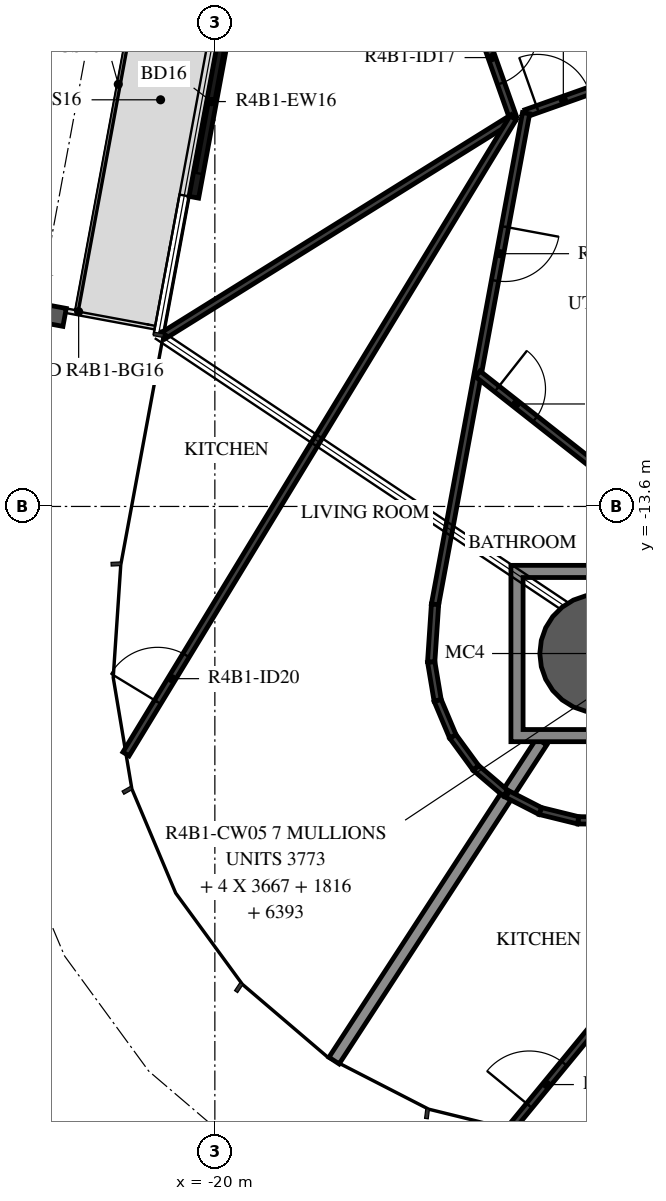
"""IFC4 building model, lengths in metres.
Left out: names, types, materials, properties, quantities, classifications, styles, units other than length and angle.
Written with IfcOpenShell. Run it as: python <this file> out.ifc"""

import sys

from ifc_helpers import new_model, si_unit, direction, frame, frame_2d, origin, origin_2d, place, context, subcontext, project, spatial, polyline, rectangle, hollow_circle, i_section, outline, extrude, element, fill, save


model = new_model("IFC4")
c1 = context("Model", 3, precision=1e-05, world=origin(), true_north=direction((0.0, 1.0)))
c2 = subcontext(c1, "Body", "Model", "MODEL_VIEW")
j1 = project(units=[si_unit("LENGTHUNIT", "METRE"), si_unit("PLANEANGLEUNIT", "RADIAN")], contexts=[c1])
p1 = place(None, origin())
s1 = spatial("IfcSite", under=j1, at=p1, CompositionType="ELEMENT")
p2 = place(p1, origin())
s2 = spatial("IfcBuilding", under=s1, at=p2, CompositionType="ELEMENT")
p3 = place(p2, frame((0.0, 0.0, 162.2)))
s3 = spatial("IfcBuildingStorey", under=s2, at=p3, CompositionType="ELEMENT", Elevation=162.2)
p4 = place(p3, frame((-13.681, -16.019, -0.38), z_axis=(0.0, 0.0, 1.0), x_axis=(1.0, 0.0, 0.0)))
e1 = element("IfcColumn", 1, at=p4, inside=s3, PredefinedType="COLUMN", context=c2, shape_type="SweptSolid", body=[
    extrude(hollow_circle(Radius=0.975, WallThickness=0.045, at=origin_2d()), origin(), (0.0, 0.0, 1.0), 3.5),
])
p5 = place(p3, frame((-22.914, -10.409, -0.38), z_axis=(0.0, 0.0, 1.0), x_axis=(0.182235967681, 0.983254825609, 0.0)))
e2 = element("IfcColumn", 2, at=p5, inside=s3, PredefinedType="COLUMN", context=c2, shape_type="SweptSolid", body=[
    extrude(i_section(OverallWidth=0.3, OverallDepth=0.9, WebThickness=0.019, FlangeThickness=0.035, FilletRadius=0.03, at=origin_2d()), origin(), (0.0, 0.0, 1.0), 3.5),
])
p6 = place(p3, frame((-19.762, -5.369, 0.0), z_axis=(0.0, 0.0, 1.0), x_axis=(-0.18226136951, -0.983250117307, 0.0)))
e3 = element("IfcWall", 3, at=p6, inside=s3, PredefinedType="STANDARD", context=c2, shape_type="SweptSolid", body=[
    extrude(rectangle(XDim=3.2, YDim=0.16, at=frame_2d((1.6, 0.0))), origin(), (0.0, 0.0, 1.0), 3.12),
])
p7 = place(p6, frame((0.4, 0.0, 0.0)))
e4 = element("IfcOpeningElement", 4, at=p7, cuts=e3, PredefinedType="OPENING", context=c2, shape_type="SweptSolid", body=[
    extrude(rectangle(XDim=2.4, YDim=2.4, at=frame_2d((1.2, 1.2))), frame((0.0, 0.09, 0.0), z_axis=(0.0, -1.0, 0.0), x_axis=(1.0, 0.0, 0.0)), (0.0, 0.0, 1.0), 0.18),
])
p8 = place(p3, frame((-18.04, -22.713, 0.0), z_axis=(0.0, 0.0, 1.0), x_axis=(0.545628572271, 0.838027124335, 0.0)))
e5 = element("IfcWall", 5, at=p8, inside=s3, PredefinedType="STANDARD", context=c2, shape_type="SweptSolid", body=[
    extrude(rectangle(XDim=6.258, YDim=0.2, at=frame_2d((3.129, 0.0))), origin(), (0.0, 0.0, 1.0), 2.73),
])
p9 = place(p3, frame((-15.663, -5.606, 0.0), z_axis=(0.0, 0.0, 1.0), x_axis=(0.333751436931, -0.942661115325, 0.0)))
e6 = element("IfcWall", 6, at=p9, inside=s3, PredefinedType="PARTITIONING", context=c2, shape_type="SweptSolid", body=[
    extrude(rectangle(XDim=1.7, YDim=0.12, at=frame_2d((0.85, 0.0))), origin(), (0.0, 0.0, 1.0), 3.12),
])
p10 = place(p9, frame((0.2, 0.0, 0.0)))
e7 = element("IfcOpeningElement", 7, at=p10, cuts=e6, PredefinedType="OPENING", context=c2, shape_type="SweptSolid", body=[
    extrude(rectangle(XDim=0.9, YDim=2.1, at=frame_2d((0.45, 1.05))), frame((0.0, 0.07, 0.0), z_axis=(0.0, -1.0, 0.0), x_axis=(1.0, 0.0, 0.0)), (0.0, 0.0, 1.0), 0.14),
])
p11 = place(p3, frame((-14.882, -7.133, 0.0), z_axis=(0.0, 0.0, 1.0), x_axis=(0.942631466676, 0.333835165961, 0.0)))
e8 = element("IfcWall", 8, at=p11, inside=s3, PredefinedType="PARTITIONING", context=c2, shape_type="SweptSolid", body=[
    extrude(rectangle(XDim=1.51, YDim=0.12, at=frame_2d((0.755, 0.0))), origin(), (0.0, 0.0, 1.0), 3.12),
])
p12 = place(p11, frame((0.2, 0.0, 0.0)))
e9 = element("IfcOpeningElement", 9, at=p12, cuts=e8, PredefinedType="OPENING", context=c2, shape_type="SweptSolid", body=[
    extrude(rectangle(XDim=0.9, YDim=2.1, at=frame_2d((0.45, 1.05))), frame((0.0, 0.07, 0.0), z_axis=(0.0, -1.0, 0.0), x_axis=(1.0, 0.0, 0.0)), (0.0, 0.0, 1.0), 0.14),
])
p13 = place(p3, frame((-20.849, -10.792, 0.0), z_axis=(0.0, 0.0, 1.0), x_axis=(0.848835001009, 0.528657867682, 0.0)))
e10 = element("IfcWall", 10, at=p13, inside=s3, PredefinedType="PARTITIONING", context=c2, shape_type="SweptSolid", body=[
    extrude(rectangle(XDim=6.778, YDim=0.12, at=frame_2d((3.389, 0.0))), origin(), (0.0, 0.0, 1.0), 3.12),
])
p14 = place(p3, frame((-21.461, -17.671, 0.0), z_axis=(0.0, 0.0, 1.0), x_axis=(0.519791999186, 0.854292852353, 0.0)))
e11 = element("IfcWall", 11, at=p14, inside=s3, PredefinedType="PARTITIONING", context=c2, shape_type="SweptSolid", body=[
    extrude(rectangle(XDim=12.247, YDim=0.12, at=frame_2d((6.124, 0.0))), origin(), (0.0, 0.0, 1.0), 3.12),
])
p15 = place(p14, frame((1.0, 0.0, 0.0)))
e12 = element("IfcOpeningElement", 12, at=p15, cuts=e11, PredefinedType="OPENING", context=c2, shape_type="SweptSolid", body=[
    extrude(rectangle(XDim=0.9, YDim=2.1, at=frame_2d((0.45, 1.05))), frame((0.0, 0.07, 0.0), z_axis=(0.0, -1.0, 0.0), x_axis=(1.0, 0.0, 0.0)), (0.0, 0.0, 1.0), 0.14),
])
p16 = place(p3, frame((-14.882, -7.133, 0.0), z_axis=(0.0, 0.0, 1.0), x_axis=(-0.182231858218, -0.983255587246, 0.0)))
e13 = element("IfcWall", 13, at=p16, inside=s3, PredefinedType="PARTITIONING", context=c2, shape_type="SweptSolid", body=[
    extrude(rectangle(XDim=8.215, YDim=0.12, at=frame_2d((4.107, 0.0))), origin(), (0.0, 0.0, 1.0), 3.12),
])
p17 = place(p16, frame((1.9, 0.0, 0.0)))
e14 = element("IfcOpeningElement", 14, at=p17, cuts=e13, PredefinedType="OPENING", context=c2, shape_type="SweptSolid", body=[
    extrude(rectangle(XDim=0.9, YDim=2.1, at=frame_2d((0.45, 1.05))), frame((0.0, 0.07, 0.0), z_axis=(0.0, -1.0, 0.0), x_axis=(1.0, 0.0, 0.0)), (0.0, 0.0, 1.0), 0.14),
])
p18 = place(p3, frame((-15.677, -11.42, 0.0), z_axis=(0.0, 0.0, 1.0), x_axis=(0.785821888461, -0.618452875824, 0.0)))
e15 = element("IfcWall", 15, at=p18, inside=s3, PredefinedType="PARTITIONING", context=c2, shape_type="SweptSolid", body=[
    extrude(rectangle(XDim=4.507, YDim=0.12, at=frame_2d((2.254, 0.0))), origin(), (0.0, 0.0, 1.0), 3.12),
])
p19 = place(p18, frame((0.4, 0.0, 0.0)))
e16 = element("IfcOpeningElement", 16, at=p19, cuts=e15, PredefinedType="OPENING", context=c2, shape_type="SweptSolid", body=[
    extrude(rectangle(XDim=0.8, YDim=2.1, at=frame_2d((0.4, 1.05))), frame((0.0, 0.07, 0.0), z_axis=(0.0, -1.0, 0.0), x_axis=(1.0, 0.0, 0.0)), (0.0, 0.0, 1.0), 0.14),
])
for number, where, z_axis, x_axis in (
    (17, (-15.22, -18.315, 0.0), (0.0, 0.0, 1.0), (-0.76, 0.65, 0.0)),
    (18, (-15.708, -17.898, 0.0), (0.0, 0.0, 1.0), (-0.59, 0.807, 0.0)),
):
    element("IfcWall", number, at=place(p3, frame(where, z_axis=z_axis, x_axis=x_axis)), inside=s3, PredefinedType="PARTITIONING", context=c2, shape_type="SweptSolid", body=[
        extrude(rectangle(XDim=0.642, YDim=0.12, at=frame_2d((0.321, 0.0))), origin(), (0.0, 0.0, 1.0), 3.12),
    ])
p20 = place(p3, frame((-16.087, -17.38, 0.0), z_axis=(0.0, 0.0, 1.0), x_axis=(-0.387852998664, 0.921721243884, 0.0)))
e19 = element("IfcWall", 19, at=p20, inside=s3, PredefinedType="PARTITIONING", context=c2, shape_type="SweptSolid", body=[
    extrude(rectangle(XDim=0.642, YDim=0.12, at=frame_2d((0.321, 0.0))), origin(), (0.0, 0.0, 1.0), 3.12),
])
p21 = place(p3, frame((-16.336, -16.788, 0.0), z_axis=(0.0, 0.0, 1.0), x_axis=(-0.165077433319, 0.986280609669, 0.0)))
e20 = element("IfcWall", 20, at=p21, inside=s3, PredefinedType="PARTITIONING", context=c2, shape_type="SweptSolid", body=[
    extrude(rectangle(XDim=0.642, YDim=0.12, at=frame_2d((0.321, 0.0))), origin(), (0.0, 0.0, 1.0), 3.12),
])
p22 = place(p3, frame((-16.442, -16.155, 0.0), z_axis=(0.0, 0.0, 1.0), x_axis=(0.066775688713, 0.997768012815, 0.0)))
e21 = element("IfcWall", 21, at=p22, inside=s3, PredefinedType="PARTITIONING", context=c2, shape_type="SweptSolid", body=[
    extrude(rectangle(XDim=0.947, YDim=0.12, at=frame_2d((0.474, 0.0))), origin(), (0.0, 0.0, 1.0), 3.12),
])
p23 = place(p3, frame((-13.384, -18.767, 0.0), z_axis=(0.0, 0.0, 1.0), x_axis=(-0.999965015064, 0.008364726362, 0.0)))
e22 = element("IfcWall", 22, at=p23, inside=s3, PredefinedType="PARTITIONING", context=c2, shape_type="SweptSolid", body=[
    extrude(rectangle(XDim=0.642, YDim=0.12, at=frame_2d((0.321, 0.0))), origin(), (0.0, 0.0, 1.0), 3.12),
])
p24 = place(p3, frame((-14.026, -18.762, 0.0), z_axis=(0.0, 0.0, 1.0), x_axis=(-0.970964611728, 0.239223165208, 0.0)))
e23 = element("IfcWall", 23, at=p24, inside=s3, PredefinedType="PARTITIONING", context=c2, shape_type="SweptSolid", body=[
    extrude(rectangle(XDim=0.642, YDim=0.12, at=frame_2d((0.321, 0.0))), origin(), (0.0, 0.0, 1.0), 3.12),
])
p25 = place(p3, frame((-14.649, -18.608, 0.0), z_axis=(0.0, 0.0, 1.0), x_axis=(-0.889695551631, 0.456554296232, 0.0)))
e24 = element("IfcWall", 24, at=p25, inside=s3, PredefinedType="PARTITIONING", context=c2, shape_type="SweptSolid", body=[
    extrude(rectangle(XDim=0.605, YDim=0.12, at=frame_2d((0.302, 0.0))), origin(), (0.0, 0.0, 1.0), 3.12),
])
p26 = place(p3, frame((-15.146, -23.841, 0.0), z_axis=(0.0, 0.0, 1.0), x_axis=(0.634970373647, 0.772536487547, 0.0)))
e25 = element("IfcWall", 25, at=p26, inside=s3, PredefinedType="PARTITIONING", context=c2, shape_type="SweptSolid", body=[
    extrude(rectangle(XDim=7.912, YDim=0.12, at=frame_2d((3.956, 0.0))), origin(), (0.0, 0.0, 1.0), 3.12),
])
p27 = place(p26, frame((0.5, 0.0, 0.0)))
e26 = element("IfcOpeningElement", 26, at=p27, cuts=e25, PredefinedType="OPENING", context=c2, shape_type="SweptSolid", body=[
    extrude(rectangle(XDim=0.9, YDim=2.1, at=frame_2d((0.45, 1.05))), frame((0.0, 0.07, 0.0), z_axis=(0.0, -1.0, 0.0), x_axis=(1.0, 0.0, 0.0)), (0.0, 0.0, 1.0), 0.14),
])
p28 = place(p3, origin())
e27 = element("IfcWall", 27, at=p28, inside=s3, PredefinedType="STANDARD", context=c2, shape_type="SweptSolid", body=[
    extrude(outline(polyline([(-12.231, -14.569), (-12.231, -17.469), (-15.131, -17.469), (-15.131, -14.569), (-12.231, -14.569)]), holes=[polyline([(-14.931, -17.269), (-12.431, -17.269), (-12.431, -14.769), (-14.931, -14.769), (-14.931, -17.269)])]), origin(), (0.0, 0.0, 1.0), 3.12),
])
p29 = place(p7, origin())
e28 = element("IfcDoor", 28, at=p29, inside=s3, OperationType="DOUBLE_DOOR_SLIDING", PredefinedType="DOOR", context=c2, shape_type="SweptSolid", body=[
    extrude(rectangle(XDim=2.4, YDim=2.4, at=frame_2d((1.2, 1.2))), frame((0.0, 0.025, 0.0), z_axis=(0.0, -1.0, 0.0), x_axis=(1.0, 0.0, 0.0)), (0.0, 0.0, 1.0), 0.05),
])
fill(e4, e28)
p30 = place(p10, origin())
e29 = element("IfcDoor", 29, at=p30, inside=s3, OperationType="SINGLE_SWING_RIGHT", PredefinedType="DOOR", context=c2, shape_type="SweptSolid", body=[
    extrude(rectangle(XDim=0.9, YDim=2.1, at=frame_2d((0.45, 1.05))), frame((0.0, 0.025, 0.0), z_axis=(0.0, -1.0, 0.0), x_axis=(1.0, 0.0, 0.0)), (0.0, 0.0, 1.0), 0.05),
])
fill(e7, e29)
p31 = place(p12, origin())
e30 = element("IfcDoor", 30, at=p31, inside=s3, OperationType="SINGLE_SWING_LEFT", PredefinedType="DOOR", context=c2, shape_type="SweptSolid", body=[
    extrude(rectangle(XDim=0.9, YDim=2.1, at=frame_2d((0.45, 1.05))), frame((0.0, 0.025, 0.0), z_axis=(0.0, -1.0, 0.0), x_axis=(1.0, 0.0, 0.0)), (0.0, 0.0, 1.0), 0.05),
])
fill(e9, e30)
p32 = place(p17, origin())
e31 = element("IfcDoor", 31, at=p32, inside=s3, OperationType="SINGLE_SWING_RIGHT", PredefinedType="DOOR", context=c2, shape_type="SweptSolid", body=[
    extrude(rectangle(XDim=0.9, YDim=2.1, at=frame_2d((0.45, 1.05))), frame((0.0, 0.025, 0.0), z_axis=(0.0, -1.0, 0.0), x_axis=(1.0, 0.0, 0.0)), (0.0, 0.0, 1.0), 0.05),
])
fill(e14, e31)
p33 = place(p19, origin())
e32 = element("IfcDoor", 32, at=p33, inside=s3, OperationType="SINGLE_SWING_RIGHT", PredefinedType="DOOR", context=c2, shape_type="SweptSolid", body=[
    extrude(rectangle(XDim=0.8, YDim=2.1, at=frame_2d((0.4, 1.05))), frame((0.0, 0.025, 0.0), z_axis=(0.0, -1.0, 0.0), x_axis=(1.0, 0.0, 0.0)), (0.0, 0.0, 1.0), 0.05),
])
fill(e16, e32)
p34 = place(p15, origin())
e33 = element("IfcDoor", 33, at=p34, inside=s3, OperationType="SINGLE_SWING_LEFT", PredefinedType="DOOR", context=c2, shape_type="SweptSolid", body=[
    extrude(rectangle(XDim=0.9, YDim=2.1, at=frame_2d((0.45, 1.05))), frame((0.0, 0.025, 0.0), z_axis=(0.0, -1.0, 0.0), x_axis=(1.0, 0.0, 0.0)), (0.0, 0.0, 1.0), 0.05),
])
fill(e12, e33)
p35 = place(p27, origin())
e34 = element("IfcDoor", 34, at=p35, inside=s3, OperationType="SINGLE_SWING_LEFT", PredefinedType="DOOR", context=c2, shape_type="SweptSolid", body=[
    extrude(rectangle(XDim=0.9, YDim=2.1, at=frame_2d((0.45, 1.05))), frame((0.0, 0.025, 0.0), z_axis=(0.0, -1.0, 0.0), x_axis=(1.0, 0.0, 0.0)), (0.0, 0.0, 1.0), 0.05),
])
fill(e26, e34)
save(model, sys.argv[1])
